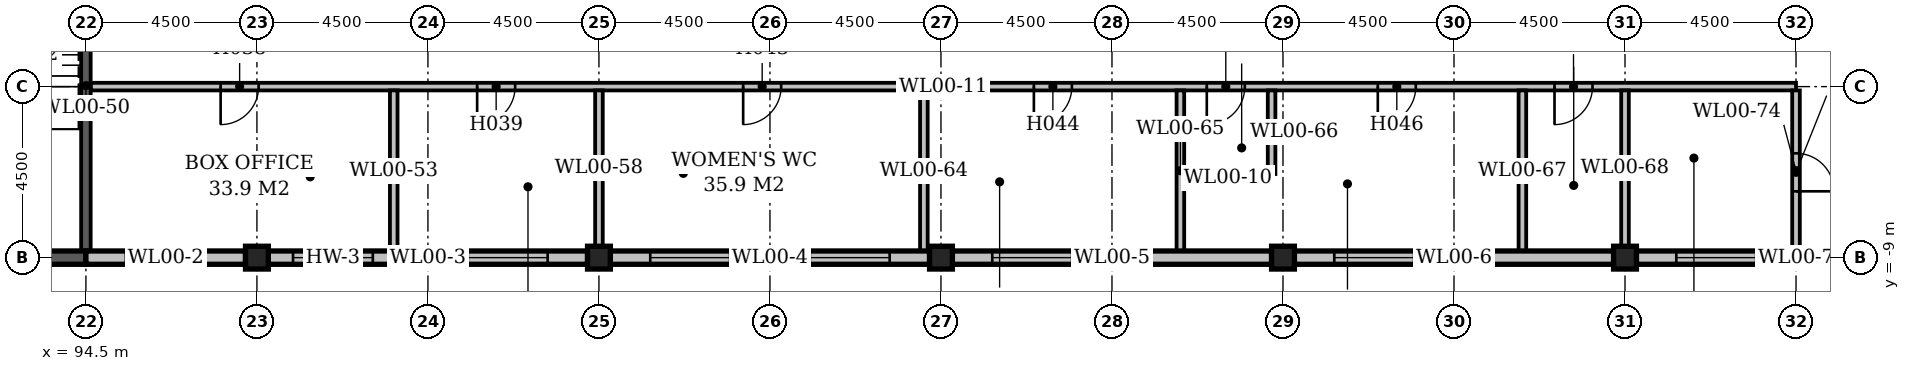
"""IFC4 building model, lengths in metres.
Left out: names, types, materials, properties, quantities, classifications, styles, units other than length and angle.
Written with IfcOpenShell. Run it as: python <this file> out.ifc"""

import sys

from ifc_helpers import new_model, si_unit, direction, frame, frame_2d, origin, origin_2d, place, context, subcontext, project, spatial, rectangle, extrude, element, fill, save


model = new_model("IFC4")
c1 = context("Model", 3, precision=1e-05, world=origin(), true_north=direction((0.0, 1.0)))
c2 = subcontext(c1, "Body", "Model", "MODEL_VIEW")
j1 = project(units=[si_unit("LENGTHUNIT", "METRE"), si_unit("PLANEANGLEUNIT", "RADIAN")], contexts=[c1])
p1 = place(None, origin())
s1 = spatial("IfcSite", under=j1, at=p1, CompositionType="ELEMENT")
p2 = place(p1, origin())
s2 = spatial("IfcBuilding", under=s1, at=p2, CompositionType="ELEMENT")
p3 = place(p2, origin())
s3 = spatial("IfcBuildingStorey", under=s2, at=p3, CompositionType="ELEMENT", Elevation=0.0)
for number, where, z_axis, x_axis in (
    (1, (99.0, -9.0, 0.0), (0.0, 0.0, 1.0), (1.0, 0.0, 0.0)),
    (2, (108.0, -9.0, 0.0), (0.0, 0.0, 1.0), (1.0, 0.0, 0.0)),
    (3, (117.0, -9.0, 0.0), (0.0, 0.0, 1.0), (1.0, 0.0, 0.0)),
    (4, (126.0, -9.0, 0.0), (0.0, 0.0, 1.0), (1.0, 0.0, 0.0)),
    (5, (135.0, -9.0, 0.0), (0.0, 0.0, 1.0), (1.0, 0.0, 0.0)),
):
    element("IfcColumn", number, at=place(p3, frame(where, z_axis=z_axis, x_axis=x_axis)), inside=s3, PredefinedType="COLUMN", context=c2, shape_type="SweptSolid", body=[
        extrude(rectangle(XDim=0.6, YDim=0.6, at=origin_2d()), origin(), (0.0, 0.0, 1.0), 8.7),
    ])
p4 = place(p3, frame((90.35, -9.0, 0.0), z_axis=(0.0, 0.0, 1.0), x_axis=(1.0, 0.0, 0.0)))
e6 = element("IfcWall", 6, at=p4, inside=s3, PredefinedType="STANDARD", context=c2, shape_type="SweptSolid", body=[
    extrude(rectangle(XDim=4.15, YDim=0.35, at=frame_2d((2.075, 0.0))), origin(), (0.0, 0.0, 1.0), 9.0),
])
p5 = place(p3, frame((94.5, -9.0, 0.0), z_axis=(0.0, 0.0, 1.0), x_axis=(1.0, 0.0, 0.0)))
e7 = element("IfcWall", 7, at=p5, inside=s3, PredefinedType="STANDARD", context=c2, shape_type="SweptSolid", body=[
    extrude(rectangle(XDim=4.2, YDim=0.35, at=frame_2d((2.1, 0.0))), origin(), (0.0, 0.0, 1.0), 8.1),
])
p6 = place(p5, frame((1.05, 0.0, 1.2)))
e8 = element("IfcOpeningElement", 8, at=p6, cuts=e7, PredefinedType="OPENING", context=c2, shape_type="SweptSolid", body=[
    extrude(rectangle(XDim=2.1, YDim=2.4, at=frame_2d((1.05, 1.2))), frame((0.0, 0.187, 0.0), z_axis=(0.0, -1.0, 0.0), x_axis=(1.0, 0.0, 0.0)), (0.0, 0.0, 1.0), 0.374),
])
p7 = place(p3, frame((99.3, -9.0, 0.0), z_axis=(0.0, 0.0, 1.0), x_axis=(1.0, 0.0, 0.0)))
e9 = element("IfcWall", 9, at=p7, inside=s3, PredefinedType="STANDARD", context=c2, shape_type="SweptSolid", body=[
    extrude(rectangle(XDim=8.4, YDim=0.35, at=frame_2d((4.2, 0.0))), origin(), (0.0, 0.0, 1.0), 8.1),
])
p8 = place(p7, frame((0.65, 0.0, 1.2)))
e10 = element("IfcOpeningElement", 10, at=p8, cuts=e9, PredefinedType="OPENING", context=c2, shape_type="SweptSolid", body=[
    extrude(rectangle(XDim=2.1, YDim=2.4, at=frame_2d((1.05, 1.2))), frame((0.0, 0.187, 0.0), z_axis=(0.0, -1.0, 0.0), x_axis=(1.0, 0.0, 0.0)), (0.0, 0.0, 1.0), 0.374),
])
p9 = place(p7, frame((5.25, 0.0, 1.2)))
e11 = element("IfcOpeningElement", 11, at=p9, cuts=e9, PredefinedType="OPENING", context=c2, shape_type="SweptSolid", body=[
    extrude(rectangle(XDim=2.1, YDim=2.4, at=frame_2d((1.05, 1.2))), frame((0.0, 0.187, 0.0), z_axis=(0.0, -1.0, 0.0), x_axis=(1.0, 0.0, 0.0)), (0.0, 0.0, 1.0), 0.374),
])
p10 = place(p3, frame((108.3, -9.0, 0.0), z_axis=(0.0, 0.0, 1.0), x_axis=(1.0, 0.0, 0.0)))
e12 = element("IfcWall", 12, at=p10, inside=s3, PredefinedType="STANDARD", context=c2, shape_type="SweptSolid", body=[
    extrude(rectangle(XDim=8.4, YDim=0.35, at=frame_2d((4.2, 0.0))), origin(), (0.0, 0.0, 1.0), 8.1),
])
p11 = place(p10, frame((1.05, 0.0, 1.2)))
e13 = element("IfcOpeningElement", 13, at=p11, cuts=e12, PredefinedType="OPENING", context=c2, shape_type="SweptSolid", body=[
    extrude(rectangle(XDim=2.1, YDim=2.4, at=frame_2d((1.05, 1.2))), frame((0.0, 0.187, 0.0), z_axis=(0.0, -1.0, 0.0), x_axis=(1.0, 0.0, 0.0)), (0.0, 0.0, 1.0), 0.374),
])
p12 = place(p10, frame((5.25, 0.0, 1.2)))
e14 = element("IfcOpeningElement", 14, at=p12, cuts=e12, PredefinedType="OPENING", context=c2, shape_type="SweptSolid", body=[
    extrude(rectangle(XDim=2.1, YDim=2.4, at=frame_2d((1.05, 1.2))), frame((0.0, 0.187, 0.0), z_axis=(0.0, -1.0, 0.0), x_axis=(1.0, 0.0, 0.0)), (0.0, 0.0, 1.0), 0.374),
])
p13 = place(p3, frame((117.3, -9.0, 0.0), z_axis=(0.0, 0.0, 1.0), x_axis=(1.0, 0.0, 0.0)))
e15 = element("IfcWall", 15, at=p13, inside=s3, PredefinedType="STANDARD", context=c2, shape_type="SweptSolid", body=[
    extrude(rectangle(XDim=8.4, YDim=0.35, at=frame_2d((4.2, 0.0))), origin(), (0.0, 0.0, 1.0), 8.1),
])
p14 = place(p13, frame((1.05, 0.0, 1.2)))
e16 = element("IfcOpeningElement", 16, at=p14, cuts=e15, PredefinedType="OPENING", context=c2, shape_type="SweptSolid", body=[
    extrude(rectangle(XDim=2.1, YDim=2.4, at=frame_2d((1.05, 1.2))), frame((0.0, 0.187, 0.0), z_axis=(0.0, -1.0, 0.0), x_axis=(1.0, 0.0, 0.0)), (0.0, 0.0, 1.0), 0.374),
])
p15 = place(p3, frame((126.3, -9.0, 0.0), z_axis=(0.0, 0.0, 1.0), x_axis=(1.0, 0.0, 0.0)))
e17 = element("IfcWall", 17, at=p15, inside=s3, PredefinedType="STANDARD", context=c2, shape_type="SweptSolid", body=[
    extrude(rectangle(XDim=8.4, YDim=0.35, at=frame_2d((4.2, 0.0))), origin(), (0.0, 0.0, 1.0), 8.1),
])
p16 = place(p15, frame((1.05, 0.0, 1.2)))
e18 = element("IfcOpeningElement", 18, at=p16, cuts=e17, PredefinedType="OPENING", context=c2, shape_type="SweptSolid", body=[
    extrude(rectangle(XDim=2.1, YDim=2.4, at=frame_2d((1.05, 1.2))), frame((0.0, 0.187, 0.0), z_axis=(0.0, -1.0, 0.0), x_axis=(1.0, 0.0, 0.0)), (0.0, 0.0, 1.0), 0.374),
])
p17 = place(p3, frame((135.3, -9.0, 0.0), z_axis=(0.0, 0.0, 1.0), x_axis=(1.0, 0.0, 0.0)))
e19 = element("IfcWall", 19, at=p17, inside=s3, PredefinedType="STANDARD", context=c2, shape_type="SweptSolid", body=[
    extrude(rectangle(XDim=8.4, YDim=0.35, at=frame_2d((4.2, 0.0))), origin(), (0.0, 0.0, 1.0), 8.1),
])
p18 = place(p17, frame((1.05, 0.0, 1.2)))
e20 = element("IfcOpeningElement", 20, at=p18, cuts=e19, PredefinedType="OPENING", context=c2, shape_type="SweptSolid", body=[
    extrude(rectangle(XDim=2.1, YDim=2.4, at=frame_2d((1.05, 1.2))), frame((0.0, 0.187, 0.0), z_axis=(0.0, -1.0, 0.0), x_axis=(1.0, 0.0, 0.0)), (0.0, 0.0, 1.0), 0.374),
])
p19 = place(p3, frame((123.4, -6.9, 0.0), z_axis=(0.0, 0.0, 1.0), x_axis=(1.0, 0.0, 0.0)))
e21 = element("IfcWall", 21, at=p19, inside=s3, PredefinedType="STANDARD", context=c2, shape_type="SweptSolid", body=[
    extrude(rectangle(XDim=2.3, YDim=0.2, at=frame_2d((1.15, 0.0))), origin(), (0.0, 0.0, 1.0), 8.7),
])
p20 = place(p3, frame((94.625, -4.5, 0.0), z_axis=(0.0, 0.0, 1.0), x_axis=(1.0, 0.0, 0.0)))
e22 = element("IfcWall", 22, at=p20, inside=s3, PredefinedType="STANDARD", context=c2, shape_type="SweptSolid", body=[
    extrude(rectangle(XDim=44.875, YDim=0.2, at=frame_2d((22.438, 0.0))), origin(), (0.0, 0.0, 1.0), 8.7),
])
p21 = place(p20, frame((3.42, 0.0, 0.0)))
e23 = element("IfcOpeningElement", 23, at=p21, cuts=e22, PredefinedType="OPENING", context=c2, shape_type="SweptSolid", body=[
    extrude(rectangle(XDim=1.0, YDim=2.1, at=frame_2d((0.5, 1.05))), frame((0.0, 0.112, 0.0), z_axis=(0.0, -1.0, 0.0), x_axis=(1.0, 0.0, 0.0)), (0.0, 0.0, 1.0), 0.224),
])
p22 = place(p20, frame((10.17, 0.0, 0.0)))
e24 = element("IfcOpeningElement", 24, at=p22, cuts=e22, PredefinedType="OPENING", context=c2, shape_type="SweptSolid", body=[
    extrude(rectangle(XDim=1.0, YDim=2.1, at=frame_2d((0.5, 1.05))), frame((0.0, 0.112, 0.0), z_axis=(0.0, -1.0, 0.0), x_axis=(1.0, 0.0, 0.0)), (0.0, 0.0, 1.0), 0.224),
])
p23 = place(p20, frame((17.17, 0.0, 0.0)))
e25 = element("IfcOpeningElement", 25, at=p23, cuts=e22, PredefinedType="OPENING", context=c2, shape_type="SweptSolid", body=[
    extrude(rectangle(XDim=1.0, YDim=2.1, at=frame_2d((0.5, 1.05))), frame((0.0, 0.112, 0.0), z_axis=(0.0, -1.0, 0.0), x_axis=(1.0, 0.0, 0.0)), (0.0, 0.0, 1.0), 0.224),
])
p24 = place(p20, frame((24.82, 0.0, 0.0)))
e26 = element("IfcOpeningElement", 26, at=p24, cuts=e22, PredefinedType="OPENING", context=c2, shape_type="SweptSolid", body=[
    extrude(rectangle(XDim=1.0, YDim=2.1, at=frame_2d((0.5, 1.05))), frame((0.0, 0.112, 0.0), z_axis=(0.0, -1.0, 0.0), x_axis=(1.0, 0.0, 0.0)), (0.0, 0.0, 1.0), 0.224),
])
p25 = place(p20, frame((29.37, 0.0, 0.0)))
e27 = element("IfcOpeningElement", 27, at=p25, cuts=e22, PredefinedType="OPENING", context=c2, shape_type="SweptSolid", body=[
    extrude(rectangle(XDim=1.0, YDim=2.1, at=frame_2d((0.5, 1.05))), frame((0.0, 0.112, 0.0), z_axis=(0.0, -1.0, 0.0), x_axis=(1.0, 0.0, 0.0)), (0.0, 0.0, 1.0), 0.224),
])
p26 = place(p20, frame((33.87, 0.0, 0.0)))
e28 = element("IfcOpeningElement", 28, at=p26, cuts=e22, PredefinedType="OPENING", context=c2, shape_type="SweptSolid", body=[
    extrude(rectangle(XDim=1.0, YDim=2.1, at=frame_2d((0.5, 1.05))), frame((0.0, 0.112, 0.0), z_axis=(0.0, -1.0, 0.0), x_axis=(1.0, 0.0, 0.0)), (0.0, 0.0, 1.0), 0.224),
])
p27 = place(p20, frame((38.52, 0.0, 0.0)))
e29 = element("IfcOpeningElement", 29, at=p27, cuts=e22, PredefinedType="OPENING", context=c2, shape_type="SweptSolid", body=[
    extrude(rectangle(XDim=1.0, YDim=2.1, at=frame_2d((0.5, 1.05))), frame((0.0, 0.112, 0.0), z_axis=(0.0, -1.0, 0.0), x_axis=(1.0, 0.0, 0.0)), (0.0, 0.0, 1.0), 0.224),
])
p28 = place(p3, frame((94.5, -8.825, 0.0), z_axis=(0.0, 0.0, 1.0), x_axis=(0.0, 1.0, 0.0)))
e30 = element("IfcWall", 30, at=p28, inside=s3, PredefinedType="STANDARD", context=c2, shape_type="SweptSolid", body=[
    extrude(rectangle(XDim=8.7, YDim=0.25, at=frame_2d((4.35, 0.0))), origin(), (0.0, 0.0, 1.0), 9.0),
])
p29 = place(p3, frame((102.6, -8.825, 0.0), z_axis=(0.0, 0.0, 1.0), x_axis=(0.0, 1.0, 0.0)))
e31 = element("IfcWall", 31, at=p29, inside=s3, PredefinedType="STANDARD", context=c2, shape_type="SweptSolid", body=[
    extrude(rectangle(XDim=4.225, YDim=0.2, at=frame_2d((2.112, 0.0))), origin(), (0.0, 0.0, 1.0), 8.7),
])
p30 = place(p3, frame((108.0, -8.7, 0.0), z_axis=(0.0, 0.0, 1.0), x_axis=(0.0, 1.0, 0.0)))
e32 = element("IfcWall", 32, at=p30, inside=s3, PredefinedType="STANDARD", context=c2, shape_type="SweptSolid", body=[
    extrude(rectangle(XDim=4.1, YDim=0.2, at=frame_2d((2.05, 0.0))), origin(), (0.0, 0.0, 1.0), 8.7),
])
for number, where, z_axis, x_axis in (
    (33, (116.55, -8.825, 0.0), (0.0, 0.0, 1.0), (0.0, 1.0, 0.0)),
    (34, (123.3, -8.825, 0.0), (0.0, 0.0, 1.0), (0.0, 1.0, 0.0)),
):
    element("IfcWall", number, at=place(p3, frame(where, z_axis=z_axis, x_axis=x_axis)), inside=s3, PredefinedType="STANDARD", context=c2, shape_type="SweptSolid", body=[
        extrude(rectangle(XDim=4.225, YDim=0.2, at=frame_2d((2.112, 0.0))), origin(), (0.0, 0.0, 1.0), 8.7),
    ])
p31 = place(p3, frame((125.7, -6.8, 0.0), z_axis=(0.0, 0.0, 1.0), x_axis=(0.0, 1.0, 0.0)))
e35 = element("IfcWall", 35, at=p31, inside=s3, PredefinedType="STANDARD", context=c2, shape_type="SweptSolid", body=[
    extrude(rectangle(XDim=2.2, YDim=0.2, at=frame_2d((1.1, 0.0))), origin(), (0.0, 0.0, 1.0), 8.7),
])
p32 = place(p3, frame((132.3, -8.825, 0.0), z_axis=(0.0, 0.0, 1.0), x_axis=(0.0, 1.0, 0.0)))
e36 = element("IfcWall", 36, at=p32, inside=s3, PredefinedType="STANDARD", context=c2, shape_type="SweptSolid", body=[
    extrude(rectangle(XDim=4.225, YDim=0.2, at=frame_2d((2.112, 0.0))), origin(), (0.0, 0.0, 1.0), 8.7),
])
p33 = place(p3, frame((135.0, -8.7, 0.0), z_axis=(0.0, 0.0, 1.0), x_axis=(0.0, 1.0, 0.0)))
e37 = element("IfcWall", 37, at=p33, inside=s3, PredefinedType="STANDARD", context=c2, shape_type="SweptSolid", body=[
    extrude(rectangle(XDim=4.1, YDim=0.2, at=frame_2d((2.05, 0.0))), origin(), (0.0, 0.0, 1.0), 8.7),
])
p34 = place(p3, frame((139.5, -8.825, 0.0), z_axis=(0.0, 0.0, 1.0), x_axis=(0.0, 1.0, 0.0)))
e38 = element("IfcWall", 38, at=p34, inside=s3, PredefinedType="STANDARD", context=c2, shape_type="SweptSolid", body=[
    extrude(rectangle(XDim=4.225, YDim=0.2, at=frame_2d((2.112, 0.0))), origin(), (0.0, 0.0, 1.0), 8.7),
])
p35 = place(p34, frame((1.57, 0.0, 0.0)))
e39 = element("IfcOpeningElement", 39, at=p35, cuts=e38, PredefinedType="OPENING", context=c2, shape_type="SweptSolid", body=[
    extrude(rectangle(XDim=1.0, YDim=2.1, at=frame_2d((0.5, 1.05))), frame((0.0, 0.112, 0.0), z_axis=(0.0, -1.0, 0.0), x_axis=(1.0, 0.0, 0.0)), (0.0, 0.0, 1.0), 0.224),
])
p36 = place(p21, frame((1.0, 0.0, 0.0), z_axis=(0.0, 0.0, 1.0), x_axis=(-1.0, 0.0, 0.0)))
e40 = element("IfcDoor", 40, at=p36, inside=s3, OperationType="SINGLE_SWING_RIGHT", PredefinedType="DOOR", context=c2, shape_type="SweptSolid", body=[
    extrude(rectangle(XDim=1.0, YDim=2.1, at=frame_2d((0.5, 1.05))), frame((0.0, 0.025, 0.0), z_axis=(0.0, -1.0, 0.0), x_axis=(1.0, 0.0, 0.0)), (0.0, 0.0, 1.0), 0.05),
])
fill(e23, e40)
p37 = place(p22, frame((1.0, 0.0, 0.0), z_axis=(0.0, 0.0, 1.0), x_axis=(-1.0, 0.0, 0.0)))
e41 = element("IfcDoor", 41, at=p37, inside=s3, OperationType="SINGLE_SWING_RIGHT", PredefinedType="DOOR", context=c2, shape_type="SweptSolid", body=[
    extrude(rectangle(XDim=1.0, YDim=2.1, at=frame_2d((0.5, 1.05))), frame((0.0, 0.025, 0.0), z_axis=(0.0, -1.0, 0.0), x_axis=(1.0, 0.0, 0.0)), (0.0, 0.0, 1.0), 0.05),
])
fill(e24, e41)
p38 = place(p35, frame((1.0, 0.0, 0.0), z_axis=(0.0, 0.0, 1.0), x_axis=(-1.0, 0.0, 0.0)))
e42 = element("IfcDoor", 42, at=p38, inside=s3, OperationType="SINGLE_SWING_RIGHT", PredefinedType="DOOR", context=c2, shape_type="SweptSolid", body=[
    extrude(rectangle(XDim=1.0, YDim=2.1, at=frame_2d((0.5, 1.05))), frame((0.0, 0.025, 0.0), z_axis=(0.0, -1.0, 0.0), x_axis=(1.0, 0.0, 0.0)), (0.0, 0.0, 1.0), 0.05),
])
fill(e39, e42)
p39 = place(p23, frame((1.0, 0.0, 0.0), z_axis=(0.0, 0.0, 1.0), x_axis=(-1.0, 0.0, 0.0)))
e43 = element("IfcDoor", 43, at=p39, inside=s3, OperationType="SINGLE_SWING_RIGHT", PredefinedType="DOOR", context=c2, shape_type="SweptSolid", body=[
    extrude(rectangle(XDim=1.0, YDim=2.1, at=frame_2d((0.5, 1.05))), frame((0.0, 0.025, 0.0), z_axis=(0.0, -1.0, 0.0), x_axis=(1.0, 0.0, 0.0)), (0.0, 0.0, 1.0), 0.05),
])
fill(e25, e43)
p40 = place(p24, frame((1.0, 0.0, 0.0), z_axis=(0.0, 0.0, 1.0), x_axis=(-1.0, 0.0, 0.0)))
e44 = element("IfcDoor", 44, at=p40, inside=s3, OperationType="SINGLE_SWING_RIGHT", PredefinedType="DOOR", context=c2, shape_type="SweptSolid", body=[
    extrude(rectangle(XDim=1.0, YDim=2.1, at=frame_2d((0.5, 1.05))), frame((0.0, 0.025, 0.0), z_axis=(0.0, -1.0, 0.0), x_axis=(1.0, 0.0, 0.0)), (0.0, 0.0, 1.0), 0.05),
])
fill(e26, e44)
p41 = place(p25, frame((1.0, 0.0, 0.0), z_axis=(0.0, 0.0, 1.0), x_axis=(-1.0, 0.0, 0.0)))
e45 = element("IfcDoor", 45, at=p41, inside=s3, OperationType="SINGLE_SWING_RIGHT", PredefinedType="DOOR", context=c2, shape_type="SweptSolid", body=[
    extrude(rectangle(XDim=1.0, YDim=2.1, at=frame_2d((0.5, 1.05))), frame((0.0, 0.025, 0.0), z_axis=(0.0, -1.0, 0.0), x_axis=(1.0, 0.0, 0.0)), (0.0, 0.0, 1.0), 0.05),
])
fill(e27, e45)
p42 = place(p26, frame((1.0, 0.0, 0.0), z_axis=(0.0, 0.0, 1.0), x_axis=(-1.0, 0.0, 0.0)))
e46 = element("IfcDoor", 46, at=p42, inside=s3, OperationType="SINGLE_SWING_RIGHT", PredefinedType="DOOR", context=c2, shape_type="SweptSolid", body=[
    extrude(rectangle(XDim=1.0, YDim=2.1, at=frame_2d((0.5, 1.05))), frame((0.0, 0.025, 0.0), z_axis=(0.0, -1.0, 0.0), x_axis=(1.0, 0.0, 0.0)), (0.0, 0.0, 1.0), 0.05),
])
fill(e28, e46)
p43 = place(p27, frame((1.0, 0.0, 0.0), z_axis=(0.0, 0.0, 1.0), x_axis=(-1.0, 0.0, 0.0)))
e47 = element("IfcDoor", 47, at=p43, inside=s3, OperationType="SINGLE_SWING_RIGHT", PredefinedType="DOOR", context=c2, shape_type="SweptSolid", body=[
    extrude(rectangle(XDim=1.0, YDim=2.1, at=frame_2d((0.5, 1.05))), frame((0.0, 0.025, 0.0), z_axis=(0.0, -1.0, 0.0), x_axis=(1.0, 0.0, 0.0)), (0.0, 0.0, 1.0), 0.05),
])
fill(e29, e47)
p44 = place(p6, origin())
e48 = element("IfcWindow", 48, at=p44, inside=s3, PartitioningType="SINGLE_PANEL", PredefinedType="WINDOW", context=c2, shape_type="SweptSolid", body=[
    extrude(rectangle(XDim=2.1, YDim=2.4, at=frame_2d((1.05, 1.2))), frame((0.0, 0.03, 0.0), z_axis=(0.0, -1.0, 0.0), x_axis=(1.0, 0.0, 0.0)), (0.0, 0.0, 1.0), 0.06),
])
fill(e8, e48)
p45 = place(p8, origin())
e49 = element("IfcWindow", 49, at=p45, inside=s3, PartitioningType="SINGLE_PANEL", PredefinedType="WINDOW", context=c2, shape_type="SweptSolid", body=[
    extrude(rectangle(XDim=2.1, YDim=2.4, at=frame_2d((1.05, 1.2))), frame((0.0, 0.03, 0.0), z_axis=(0.0, -1.0, 0.0), x_axis=(1.0, 0.0, 0.0)), (0.0, 0.0, 1.0), 0.06),
])
fill(e10, e49)
p46 = place(p9, origin())
e50 = element("IfcWindow", 50, at=p46, inside=s3, PartitioningType="SINGLE_PANEL", PredefinedType="WINDOW", context=c2, shape_type="SweptSolid", body=[
    extrude(rectangle(XDim=2.1, YDim=2.4, at=frame_2d((1.05, 1.2))), frame((0.0, 0.03, 0.0), z_axis=(0.0, -1.0, 0.0), x_axis=(1.0, 0.0, 0.0)), (0.0, 0.0, 1.0), 0.06),
])
fill(e11, e50)
p47 = place(p11, origin())
e51 = element("IfcWindow", 51, at=p47, inside=s3, PartitioningType="SINGLE_PANEL", PredefinedType="WINDOW", context=c2, shape_type="SweptSolid", body=[
    extrude(rectangle(XDim=2.1, YDim=2.4, at=frame_2d((1.05, 1.2))), frame((0.0, 0.03, 0.0), z_axis=(0.0, -1.0, 0.0), x_axis=(1.0, 0.0, 0.0)), (0.0, 0.0, 1.0), 0.06),
])
fill(e13, e51)
p48 = place(p12, origin())
e52 = element("IfcWindow", 52, at=p48, inside=s3, PartitioningType="SINGLE_PANEL", PredefinedType="WINDOW", context=c2, shape_type="SweptSolid", body=[
    extrude(rectangle(XDim=2.1, YDim=2.4, at=frame_2d((1.05, 1.2))), frame((0.0, 0.03, 0.0), z_axis=(0.0, -1.0, 0.0), x_axis=(1.0, 0.0, 0.0)), (0.0, 0.0, 1.0), 0.06),
])
fill(e14, e52)
p49 = place(p14, origin())
e53 = element("IfcWindow", 53, at=p49, inside=s3, PartitioningType="SINGLE_PANEL", PredefinedType="WINDOW", context=c2, shape_type="SweptSolid", body=[
    extrude(rectangle(XDim=2.1, YDim=2.4, at=frame_2d((1.05, 1.2))), frame((0.0, 0.03, 0.0), z_axis=(0.0, -1.0, 0.0), x_axis=(1.0, 0.0, 0.0)), (0.0, 0.0, 1.0), 0.06),
])
fill(e16, e53)
p50 = place(p16, origin())
e54 = element("IfcWindow", 54, at=p50, inside=s3, PartitioningType="SINGLE_PANEL", PredefinedType="WINDOW", context=c2, shape_type="SweptSolid", body=[
    extrude(rectangle(XDim=2.1, YDim=2.4, at=frame_2d((1.05, 1.2))), frame((0.0, 0.03, 0.0), z_axis=(0.0, -1.0, 0.0), x_axis=(1.0, 0.0, 0.0)), (0.0, 0.0, 1.0), 0.06),
])
fill(e18, e54)
p51 = place(p18, origin())
e55 = element("IfcWindow", 55, at=p51, inside=s3, PartitioningType="SINGLE_PANEL", PredefinedType="WINDOW", context=c2, shape_type="SweptSolid", body=[
    extrude(rectangle(XDim=2.1, YDim=2.4, at=frame_2d((1.05, 1.2))), frame((0.0, 0.03, 0.0), z_axis=(0.0, -1.0, 0.0), x_axis=(1.0, 0.0, 0.0)), (0.0, 0.0, 1.0), 0.06),
])
fill(e20, e55)
save(model, sys.argv[1])
